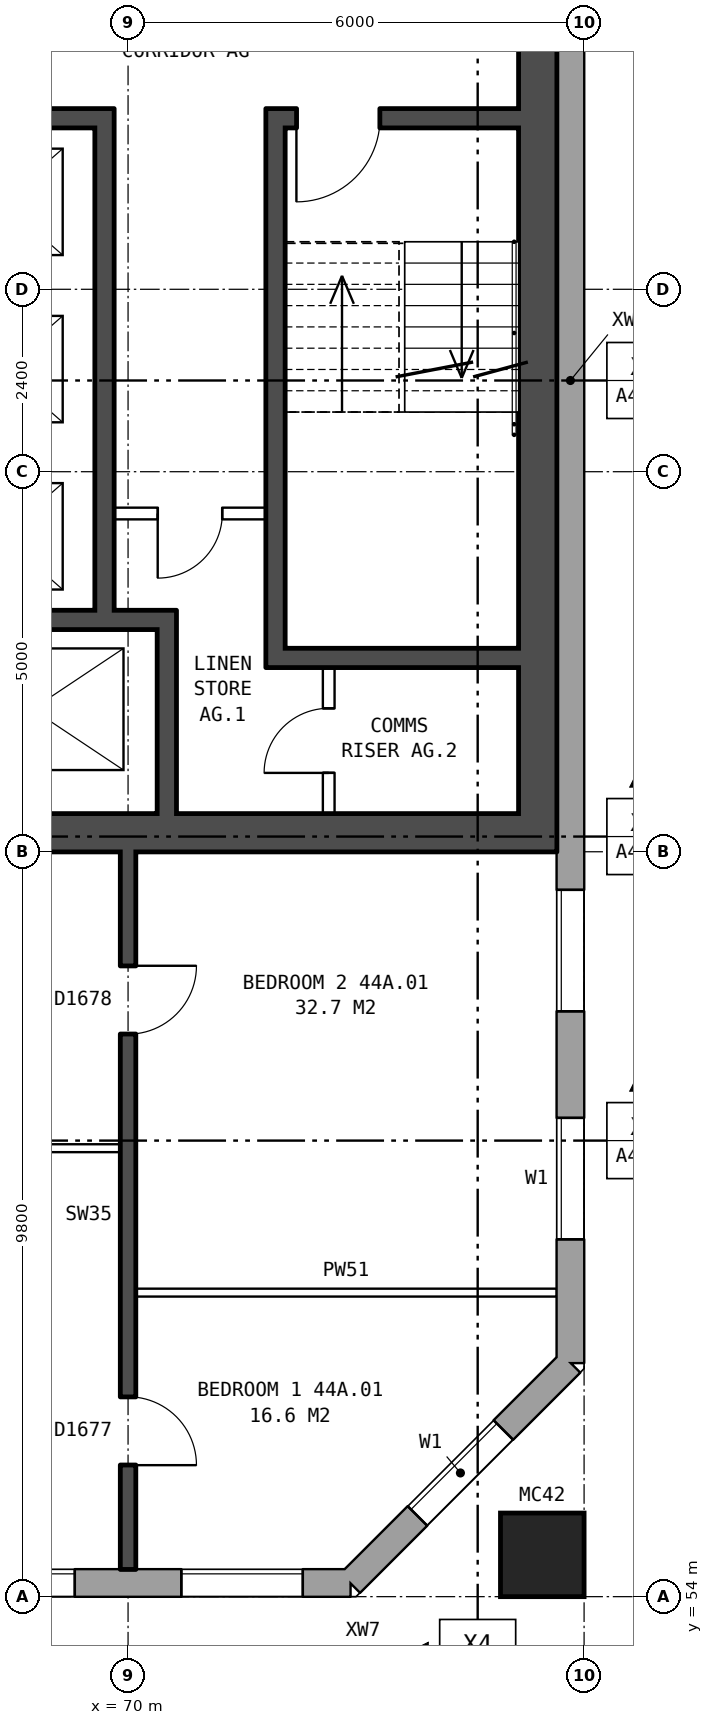
"""IFC4 building model, lengths in metres.
Left out: names, types, materials, properties, quantities, classifications, styles, units other than length and angle.
Written with IfcOpenShell. Run it as: python <this file> out.ifc"""

import sys

from ifc_helpers import new_model, si_unit, direction, frame, frame_2d, origin, origin_2d, place, context, subcontext, project, spatial, rectangle, hollow_rectangle, extrude, element, fill, save


model = new_model("IFC4")
c1 = context("Model", 3, precision=1e-05, world=origin(), true_north=direction((0.0, 1.0)))
c2 = subcontext(c1, "Body", "Model", "MODEL_VIEW")
j1 = project(units=[si_unit("LENGTHUNIT", "METRE"), si_unit("PLANEANGLEUNIT", "RADIAN")], contexts=[c1])
p1 = place(None, origin())
s1 = spatial("IfcSite", under=j1, at=p1, CompositionType="ELEMENT")
p2 = place(p1, origin())
s2 = spatial("IfcBuilding", under=s1, at=p2, CompositionType="ELEMENT")
p3 = place(p2, frame((0.0, 0.0, 157.8)))
s3 = spatial("IfcBuildingStorey", under=s2, at=p3, CompositionType="ELEMENT", Elevation=157.8)
p4 = place(p3, frame((75.45, 54.55, 0.0), z_axis=(0.0, 0.0, 1.0), x_axis=(1.0, 0.0, 0.0)))
e1 = element("IfcColumn", 1, at=p4, inside=s3, PredefinedType="COLUMN", context=c2, shape_type="SweptSolid", body=[
    extrude(hollow_rectangle(XDim=1.1, YDim=1.1, WallThickness=0.06, at=origin_2d()), origin(), (0.0, 0.0, 1.0), 3.1),
])
p5 = place(p3, frame((31.575, 54.18, 0.0), z_axis=(0.0, 0.0, 1.0), x_axis=(1.0, 0.0, 0.0)))
e2 = element("IfcWall", 2, at=p5, inside=s3, PredefinedType="STANDARD", context=c2, shape_type="SweptSolid", body=[
    extrude(rectangle(XDim=41.351, YDim=0.36, at=frame_2d((20.675, 0.0))), origin(), (0.0, 0.0, 1.0), 2.85),
])
p6 = place(p5, frame((3.125, 0.0, 0.8)))
e3 = element("IfcOpeningElement", 3, at=p6, cuts=e2, PredefinedType="OPENING", context=c2, shape_type="SweptSolid", body=[
    extrude(rectangle(XDim=1.6, YDim=1.8, at=frame_2d((0.8, 0.9))), frame((0.0, 0.19, 0.0), z_axis=(0.0, -1.0, 0.0), x_axis=(1.0, 0.0, 0.0)), (0.0, 0.0, 1.0), 0.38),
])
p7 = place(p5, frame((6.125, 0.0, 0.8)))
e4 = element("IfcOpeningElement", 4, at=p7, cuts=e2, PredefinedType="OPENING", context=c2, shape_type="SweptSolid", body=[
    extrude(rectangle(XDim=1.6, YDim=1.8, at=frame_2d((0.8, 0.9))), frame((0.0, 0.19, 0.0), z_axis=(0.0, -1.0, 0.0), x_axis=(1.0, 0.0, 0.0)), (0.0, 0.0, 1.0), 0.38),
])
p8 = place(p5, frame((8.625, 0.0, 0.8)))
e5 = element("IfcOpeningElement", 5, at=p8, cuts=e2, PredefinedType="OPENING", context=c2, shape_type="SweptSolid", body=[
    extrude(rectangle(XDim=1.0, YDim=1.8, at=frame_2d((0.5, 0.9))), frame((0.0, 0.19, 0.0), z_axis=(0.0, -1.0, 0.0), x_axis=(1.0, 0.0, 0.0)), (0.0, 0.0, 1.0), 0.38),
])
p9 = place(p5, frame((9.925, 0.0, 1.6)))
e6 = element("IfcOpeningElement", 6, at=p9, cuts=e2, PredefinedType="OPENING", context=c2, shape_type="SweptSolid", body=[
    extrude(rectangle(XDim=0.8, YDim=0.9, at=frame_2d((0.4, 0.45))), frame((0.0, 0.19, 0.0), z_axis=(0.0, -1.0, 0.0), x_axis=(1.0, 0.0, 0.0)), (0.0, 0.0, 1.0), 0.38),
])
p10 = place(p5, frame((15.125, 0.0, 0.8)))
e7 = element("IfcOpeningElement", 7, at=p10, cuts=e2, PredefinedType="OPENING", context=c2, shape_type="SweptSolid", body=[
    extrude(rectangle(XDim=1.6, YDim=1.8, at=frame_2d((0.8, 0.9))), frame((0.0, 0.19, 0.0), z_axis=(0.0, -1.0, 0.0), x_axis=(1.0, 0.0, 0.0)), (0.0, 0.0, 1.0), 0.38),
])
p11 = place(p5, frame((18.125, 0.0, 0.8)))
e8 = element("IfcOpeningElement", 8, at=p11, cuts=e2, PredefinedType="OPENING", context=c2, shape_type="SweptSolid", body=[
    extrude(rectangle(XDim=1.6, YDim=1.8, at=frame_2d((0.8, 0.9))), frame((0.0, 0.19, 0.0), z_axis=(0.0, -1.0, 0.0), x_axis=(1.0, 0.0, 0.0)), (0.0, 0.0, 1.0), 0.38),
])
p12 = place(p5, frame((21.125, 0.0, 0.8)))
e9 = element("IfcOpeningElement", 9, at=p12, cuts=e2, PredefinedType="OPENING", context=c2, shape_type="SweptSolid", body=[
    extrude(rectangle(XDim=1.6, YDim=1.8, at=frame_2d((0.8, 0.9))), frame((0.0, 0.19, 0.0), z_axis=(0.0, -1.0, 0.0), x_axis=(1.0, 0.0, 0.0)), (0.0, 0.0, 1.0), 0.38),
])
p13 = place(p5, frame((24.125, 0.0, 0.8)))
e10 = element("IfcOpeningElement", 10, at=p13, cuts=e2, PredefinedType="OPENING", context=c2, shape_type="SweptSolid", body=[
    extrude(rectangle(XDim=1.6, YDim=1.8, at=frame_2d((0.8, 0.9))), frame((0.0, 0.19, 0.0), z_axis=(0.0, -1.0, 0.0), x_axis=(1.0, 0.0, 0.0)), (0.0, 0.0, 1.0), 0.38),
])
p14 = place(p5, frame((26.625, 0.0, 0.8)))
e11 = element("IfcOpeningElement", 11, at=p14, cuts=e2, PredefinedType="OPENING", context=c2, shape_type="SweptSolid", body=[
    extrude(rectangle(XDim=1.4, YDim=1.8, at=frame_2d((0.7, 0.9))), frame((0.0, 0.19, 0.0), z_axis=(0.0, -1.0, 0.0), x_axis=(1.0, 0.0, 0.0)), (0.0, 0.0, 1.0), 0.38),
])
p15 = place(p5, frame((30.475, 0.0, 1.7)))
e12 = element("IfcOpeningElement", 12, at=p15, cuts=e2, PredefinedType="OPENING", context=c2, shape_type="SweptSolid", body=[
    extrude(rectangle(XDim=0.8, YDim=0.9, at=frame_2d((0.4, 0.45))), frame((0.0, 0.19, 0.0), z_axis=(0.0, -1.0, 0.0), x_axis=(1.0, 0.0, 0.0)), (0.0, 0.0, 1.0), 0.38),
])
p16 = place(p5, frame((33.125, 0.0, 0.8)))
e13 = element("IfcOpeningElement", 13, at=p16, cuts=e2, PredefinedType="OPENING", context=c2, shape_type="SweptSolid", body=[
    extrude(rectangle(XDim=1.6, YDim=1.8, at=frame_2d((0.8, 0.9))), frame((0.0, 0.19, 0.0), z_axis=(0.0, -1.0, 0.0), x_axis=(1.0, 0.0, 0.0)), (0.0, 0.0, 1.0), 0.38),
])
p17 = place(p5, frame((36.125, 0.0, 0.8)))
e14 = element("IfcOpeningElement", 14, at=p17, cuts=e2, PredefinedType="OPENING", context=c2, shape_type="SweptSolid", body=[
    extrude(rectangle(XDim=1.6, YDim=1.8, at=frame_2d((0.8, 0.9))), frame((0.0, 0.19, 0.0), z_axis=(0.0, -1.0, 0.0), x_axis=(1.0, 0.0, 0.0)), (0.0, 0.0, 1.0), 0.38),
])
p18 = place(p5, frame((39.125, 0.0, 0.8)))
e15 = element("IfcOpeningElement", 15, at=p18, cuts=e2, PredefinedType="OPENING", context=c2, shape_type="SweptSolid", body=[
    extrude(rectangle(XDim=1.6, YDim=1.8, at=frame_2d((0.8, 0.9))), frame((0.0, 0.19, 0.0), z_axis=(0.0, -1.0, 0.0), x_axis=(1.0, 0.0, 0.0)), (0.0, 0.0, 1.0), 0.38),
])
p19 = place(p5, frame((12.125, 0.0, 0.8)))
e16 = element("IfcOpeningElement", 16, at=p19, cuts=e2, PredefinedType="OPENING", context=c2, shape_type="SweptSolid", body=[
    extrude(rectangle(XDim=1.0, YDim=0.9, at=frame_2d((0.5, 0.45))), frame((0.0, 0.19, 0.0), z_axis=(0.0, -1.0, 0.0), x_axis=(1.0, 0.0, 0.0)), (0.0, 0.0, 1.0), 0.38),
])
p20 = place(p5, frame((13.425, 0.0, 0.8)))
e17 = element("IfcOpeningElement", 17, at=p20, cuts=e2, PredefinedType="OPENING", context=c2, shape_type="SweptSolid", body=[
    extrude(rectangle(XDim=0.8, YDim=1.8, at=frame_2d((0.4, 0.9))), frame((0.0, 0.19, 0.0), z_axis=(0.0, -1.0, 0.0), x_axis=(1.0, 0.0, 0.0)), (0.0, 0.0, 1.0), 0.38),
])
p21 = place(p5, frame((28.325, 0.0, 0.8)))
e18 = element("IfcOpeningElement", 18, at=p21, cuts=e2, PredefinedType="OPENING", context=c2, shape_type="SweptSolid", body=[
    extrude(rectangle(XDim=0.8, YDim=0.9, at=frame_2d((0.4, 0.45))), frame((0.0, 0.19, 0.0), z_axis=(0.0, -1.0, 0.0), x_axis=(1.0, 0.0, 0.0)), (0.0, 0.0, 1.0), 0.38),
])
p22 = place(p5, frame((31.625, 0.0, 0.8)))
e19 = element("IfcOpeningElement", 19, at=p22, cuts=e2, PredefinedType="OPENING", context=c2, shape_type="SweptSolid", body=[
    extrude(rectangle(XDim=0.6, YDim=1.8, at=frame_2d((0.3, 0.9))), frame((0.0, 0.19, 0.0), z_axis=(0.0, -1.0, 0.0), x_axis=(1.0, 0.0, 0.0)), (0.0, 0.0, 1.0), 0.38),
])
p23 = place(p3, frame((72.925, 54.18, 0.0), z_axis=(0.0, 0.0, 1.0), x_axis=(0.707106781187, 0.707106781187, 0.0)))
e20 = element("IfcWall", 20, at=p23, inside=s3, PredefinedType="STANDARD", context=c2, shape_type="SweptSolid", body=[
    extrude(rectangle(XDim=4.094, YDim=0.36, at=frame_2d((2.047, 0.0))), origin(), (0.0, 0.0, 1.0), 2.85),
])
p24 = place(p23, frame((1.247, 0.0, 0.8)))
e21 = element("IfcOpeningElement", 21, at=p24, cuts=e20, PredefinedType="OPENING", context=c2, shape_type="SweptSolid", body=[
    extrude(rectangle(XDim=1.6, YDim=1.8, at=frame_2d((0.8, 0.9))), frame((0.0, 0.19, 0.0), z_axis=(0.0, -1.0, 0.0), x_axis=(1.0, 0.0, 0.0)), (0.0, 0.0, 1.0), 0.38),
])
p25 = place(p3, frame((75.82, 57.075, 0.0), z_axis=(0.0, 0.0, 1.0), x_axis=(0.0, 1.0, 0.0)))
e22 = element("IfcWall", 22, at=p25, inside=s3, PredefinedType="STANDARD", context=c2, shape_type="SweptSolid", body=[
    extrude(rectangle(XDim=25.851, YDim=0.36, at=frame_2d((12.925, 0.0))), origin(), (0.0, 0.0, 1.0), 2.85),
])
p26 = place(p25, frame((1.625, 0.0, 0.8)))
e23 = element("IfcOpeningElement", 23, at=p26, cuts=e22, PredefinedType="OPENING", context=c2, shape_type="SweptSolid", body=[
    extrude(rectangle(XDim=1.6, YDim=1.8, at=frame_2d((0.8, 0.9))), frame((0.0, 0.19, 0.0), z_axis=(0.0, -1.0, 0.0), x_axis=(1.0, 0.0, 0.0)), (0.0, 0.0, 1.0), 0.38),
])
p27 = place(p25, frame((4.625, 0.0, 0.8)))
e24 = element("IfcOpeningElement", 24, at=p27, cuts=e22, PredefinedType="OPENING", context=c2, shape_type="SweptSolid", body=[
    extrude(rectangle(XDim=1.6, YDim=1.8, at=frame_2d((0.8, 0.9))), frame((0.0, 0.19, 0.0), z_axis=(0.0, -1.0, 0.0), x_axis=(1.0, 0.0, 0.0)), (0.0, 0.0, 1.0), 0.38),
])
p28 = place(p25, frame((19.625, 0.0, 0.8)))
e25 = element("IfcOpeningElement", 25, at=p28, cuts=e22, PredefinedType="OPENING", context=c2, shape_type="SweptSolid", body=[
    extrude(rectangle(XDim=1.6, YDim=1.8, at=frame_2d((0.8, 0.9))), frame((0.0, 0.19, 0.0), z_axis=(0.0, -1.0, 0.0), x_axis=(1.0, 0.0, 0.0)), (0.0, 0.0, 1.0), 0.38),
])
p29 = place(p25, frame((22.625, 0.0, 0.8)))
e26 = element("IfcOpeningElement", 26, at=p29, cuts=e22, PredefinedType="OPENING", context=c2, shape_type="SweptSolid", body=[
    extrude(rectangle(XDim=1.6, YDim=1.8, at=frame_2d((0.8, 0.9))), frame((0.0, 0.19, 0.0), z_axis=(0.0, -1.0, 0.0), x_axis=(1.0, 0.0, 0.0)), (0.0, 0.0, 1.0), 0.38),
])
p30 = place(p3, frame((75.39, 63.8, 0.0), z_axis=(0.0, 0.0, 1.0), x_axis=(0.0, 1.0, 0.0)))
e27 = element("IfcWall", 27, at=p30, inside=s3, PredefinedType="SHEAR", context=c2, shape_type="SweptSolid", body=[
    extrude(rectangle(XDim=12.4, YDim=0.5, at=frame_2d((6.2, 0.0))), origin(), (0.0, 0.0, 1.0), 2.85),
])
p31 = place(p3, frame((67.14, 64.05, 0.0), z_axis=(0.0, 0.0, 1.0), x_axis=(1.0, 0.0, 0.0)))
e28 = element("IfcWall", 28, at=p31, inside=s3, PredefinedType="SHEAR", context=c2, shape_type="SweptSolid", body=[
    extrude(rectangle(XDim=8.0, YDim=0.5, at=frame_2d((4.0, 0.0))), origin(), (0.0, 0.0, 1.0), 2.85),
])
p32 = place(p3, frame((72.065, 66.35, 0.0), z_axis=(0.0, 0.0, 1.0), x_axis=(1.0, 0.0, 0.0)))
e29 = element("IfcWall", 29, at=p32, inside=s3, PredefinedType="SHEAR", context=c2, shape_type="SweptSolid", body=[
    extrude(rectangle(XDim=3.075, YDim=0.25, at=frame_2d((1.538, 0.0))), origin(), (0.0, 0.0, 1.0), 2.85),
])
p33 = place(p3, frame((67.14, 66.85, 0.0), z_axis=(0.0, 0.0, 1.0), x_axis=(1.0, 0.0, 0.0)))
e30 = element("IfcWall", 30, at=p33, inside=s3, PredefinedType="SHEAR", context=c2, shape_type="SweptSolid", body=[
    extrude(rectangle(XDim=3.495, YDim=0.25, at=frame_2d((1.748, 0.0))), origin(), (0.0, 0.0, 1.0), 2.85),
])
p34 = place(p3, frame((69.815, 68.25, 0.0), z_axis=(0.0, 0.0, 1.0), x_axis=(1.0, 0.0, 0.0)))
e31 = element("IfcWall", 31, at=p34, inside=s3, PredefinedType="PARTITIONING", context=c2, shape_type="SweptSolid", body=[
    extrude(rectangle(XDim=2.0, YDim=0.15, at=frame_2d((1.0, 0.0))), origin(), (0.0, 0.0, 1.0), 2.85),
])
p35 = place(p34, frame((0.575, 0.0, 0.0)))
e32 = element("IfcOpeningElement", 32, at=p35, cuts=e31, PredefinedType="OPENING", context=c2, shape_type="SweptSolid", body=[
    extrude(rectangle(XDim=0.85, YDim=2.1, at=frame_2d((0.425, 1.05))), frame((0.0, 0.085, 0.0), z_axis=(0.0, -1.0, 0.0), x_axis=(1.0, 0.0, 0.0)), (0.0, 0.0, 1.0), 0.17),
])
p36 = place(p3, frame((67.14, 73.45, 0.0), z_axis=(0.0, 0.0, 1.0), x_axis=(1.0, 0.0, 0.0)))
e33 = element("IfcWall", 33, at=p36, inside=s3, PredefinedType="SHEAR", context=c2, shape_type="SweptSolid", body=[
    extrude(rectangle(XDim=2.425, YDim=0.25, at=frame_2d((1.212, 0.0))), origin(), (0.0, 0.0, 1.0), 2.85),
])
p37 = place(p3, frame((72.065, 73.45, 0.0), z_axis=(0.0, 0.0, 1.0), x_axis=(1.0, 0.0, 0.0)))
e34 = element("IfcWall", 34, at=p37, inside=s3, PredefinedType="SHEAR", context=c2, shape_type="SweptSolid", body=[
    extrude(rectangle(XDim=3.075, YDim=0.25, at=frame_2d((1.538, 0.0))), origin(), (0.0, 0.0, 1.0), 2.85),
])
p38 = place(p37, frame((0.15, 0.0, 0.0)))
e35 = element("IfcOpeningElement", 35, at=p38, cuts=e34, PredefinedType="OPENING", context=c2, shape_type="SweptSolid", body=[
    extrude(rectangle(XDim=1.1, YDim=2.1, at=frame_2d((0.55, 1.05))), frame((0.0, 0.135, 0.0), z_axis=(0.0, -1.0, 0.0), x_axis=(1.0, 0.0, 0.0)), (0.0, 0.0, 1.0), 0.27),
])
p39 = place(p3, frame((69.69, 66.975, 0.0), z_axis=(0.0, 0.0, 1.0), x_axis=(0.0, 1.0, 0.0)))
e36 = element("IfcWall", 36, at=p39, inside=s3, PredefinedType="SHEAR", context=c2, shape_type="SweptSolid", body=[
    extrude(rectangle(XDim=6.6, YDim=0.25, at=frame_2d((3.3, 0.0))), origin(), (0.0, 0.0, 1.0), 2.85),
])
p40 = place(p3, frame((70.51, 64.3, 0.0), z_axis=(0.0, 0.0, 1.0), x_axis=(0.0, 1.0, 0.0)))
e37 = element("IfcWall", 37, at=p40, inside=s3, PredefinedType="SHEAR", context=c2, shape_type="SweptSolid", body=[
    extrude(rectangle(XDim=2.425, YDim=0.25, at=frame_2d((1.212, 0.0))), origin(), (0.0, 0.0, 1.0), 2.85),
])
p41 = place(p3, frame((71.94, 66.225, 0.0), z_axis=(0.0, 0.0, 1.0), x_axis=(0.0, 1.0, 0.0)))
e38 = element("IfcWall", 38, at=p41, inside=s3, PredefinedType="SHEAR", context=c2, shape_type="SweptSolid", body=[
    extrude(rectangle(XDim=7.35, YDim=0.25, at=frame_2d((3.675, 0.0))), origin(), (0.0, 0.0, 1.0), 2.85),
])
p42 = place(p3, frame((72.64, 64.3, 0.0), z_axis=(0.0, 0.0, 1.0), x_axis=(0.0, 1.0, 0.0)))
e39 = element("IfcWall", 39, at=p42, inside=s3, PredefinedType="PARTITIONING", context=c2, shape_type="SweptSolid", body=[
    extrude(rectangle(XDim=1.925, YDim=0.15, at=frame_2d((0.962, 0.0))), origin(), (0.0, 0.0, 1.0), 2.85),
])
p43 = place(p42, frame((0.538, 0.0, 0.0)))
e40 = element("IfcOpeningElement", 40, at=p43, cuts=e39, PredefinedType="OPENING", context=c2, shape_type="SweptSolid", body=[
    extrude(rectangle(XDim=0.85, YDim=2.1, at=frame_2d((0.425, 1.05))), frame((0.0, 0.085, 0.0), z_axis=(0.0, -1.0, 0.0), x_axis=(1.0, 0.0, 0.0)), (0.0, 0.0, 1.0), 0.17),
])
p44 = place(p3, frame((70.1, 58.0, 0.0), z_axis=(0.0, 0.0, 1.0), x_axis=(1.0, 0.0, 0.0)))
e41 = element("IfcWall", 41, at=p44, inside=s3, PredefinedType="PARTITIONING", context=c2, shape_type="SweptSolid", body=[
    extrude(rectangle(XDim=5.54, YDim=0.1, at=frame_2d((2.77, 0.0))), origin(), (0.0, 0.0, 1.0), 2.85),
])
p45 = place(p3, frame((64.1, 59.9, 0.0), z_axis=(0.0, 0.0, 1.0), x_axis=(1.0, 0.0, 0.0)))
e42 = element("IfcWall", 42, at=p45, inside=s3, PredefinedType="PARTITIONING", context=c2, shape_type="SweptSolid", body=[
    extrude(rectangle(XDim=5.8, YDim=0.1, at=frame_2d((2.9, 0.0))), origin(), (0.0, 0.0, 1.0), 2.85),
])
p46 = place(p45, frame((3.6, 0.0, 0.0)))
e43 = element("IfcOpeningElement", 43, at=p46, cuts=e42, PredefinedType="OPENING", context=c2, shape_type="SweptSolid", body=[
    extrude(rectangle(XDim=0.9, YDim=2.1, at=frame_2d((0.45, 1.05))), frame((0.0, 0.06, 0.0), z_axis=(0.0, -1.0, 0.0), x_axis=(1.0, 0.0, 0.0)), (0.0, 0.0, 1.0), 0.12),
])
p47 = place(p45, frame((0.7, 0.0, 0.0)))
e44 = element("IfcOpeningElement", 44, at=p47, cuts=e42, PredefinedType="OPENING", context=c2, shape_type="SweptSolid", body=[
    extrude(rectangle(XDim=0.9, YDim=2.1, at=frame_2d((0.45, 1.05))), frame((0.0, 0.06, 0.0), z_axis=(0.0, -1.0, 0.0), x_axis=(1.0, 0.0, 0.0)), (0.0, 0.0, 1.0), 0.12),
])
p48 = place(p3, frame((70.0, 54.36, 0.0), z_axis=(0.0, 0.0, 1.0), x_axis=(0.0, 1.0, 0.0)))
e45 = element("IfcWall", 45, at=p48, inside=s3, PredefinedType="SOLIDWALL", context=c2, shape_type="SweptSolid", body=[
    extrude(rectangle(XDim=9.44, YDim=0.2, at=frame_2d((4.72, 0.0))), origin(), (0.0, 0.0, 1.0), 2.85),
])
p49 = place(p48, frame((1.37, 0.0, 0.0)))
e46 = element("IfcOpeningElement", 46, at=p49, cuts=e45, PredefinedType="OPENING", context=c2, shape_type="SweptSolid", body=[
    extrude(rectangle(XDim=0.9, YDim=2.1, at=frame_2d((0.45, 1.05))), frame((0.0, 0.11, 0.0), z_axis=(0.0, -1.0, 0.0), x_axis=(1.0, 0.0, 0.0)), (0.0, 0.0, 1.0), 0.22),
])
p50 = place(p48, frame((7.04, 0.0, 0.0)))
e47 = element("IfcOpeningElement", 47, at=p50, cuts=e45, PredefinedType="OPENING", context=c2, shape_type="SweptSolid", body=[
    extrude(rectangle(XDim=0.9, YDim=2.1, at=frame_2d((0.45, 1.05))), frame((0.0, 0.11, 0.0), z_axis=(0.0, -1.0, 0.0), x_axis=(1.0, 0.0, 0.0)), (0.0, 0.0, 1.0), 0.22),
])
p51 = place(p17, origin())
e48 = element("IfcWindow", 48, at=p51, inside=s3, PartitioningType="SINGLE_PANEL", PredefinedType="WINDOW", context=c2, shape_type="SweptSolid", body=[
    extrude(rectangle(XDim=1.6, YDim=1.8, at=frame_2d((0.8, 0.9))), frame((0.0, 0.15, 0.0), z_axis=(0.0, -1.0, 0.0), x_axis=(1.0, 0.0, 0.0)), (0.0, 0.0, 1.0), 0.06),
])
fill(e14, e48)
p52 = place(p18, origin())
e49 = element("IfcWindow", 49, at=p52, inside=s3, PartitioningType="SINGLE_PANEL", PredefinedType="WINDOW", context=c2, shape_type="SweptSolid", body=[
    extrude(rectangle(XDim=1.6, YDim=1.8, at=frame_2d((0.8, 0.9))), frame((0.0, 0.15, 0.0), z_axis=(0.0, -1.0, 0.0), x_axis=(1.0, 0.0, 0.0)), (0.0, 0.0, 1.0), 0.06),
])
fill(e15, e49)
p53 = place(p24, origin())
e50 = element("IfcWindow", 50, at=p53, inside=s3, PartitioningType="SINGLE_PANEL", PredefinedType="WINDOW", context=c2, shape_type="SweptSolid", body=[
    extrude(rectangle(XDim=1.6, YDim=1.8, at=frame_2d((0.8, 0.9))), frame((0.0, 0.15, 0.0), z_axis=(0.0, -1.0, 0.0), x_axis=(1.0, 0.0, 0.0)), (0.0, 0.0, 1.0), 0.06),
])
fill(e21, e50)
p54 = place(p26, origin())
e51 = element("IfcWindow", 51, at=p54, inside=s3, PartitioningType="SINGLE_PANEL", PredefinedType="WINDOW", context=c2, shape_type="SweptSolid", body=[
    extrude(rectangle(XDim=1.6, YDim=1.8, at=frame_2d((0.8, 0.9))), frame((0.0, 0.15, 0.0), z_axis=(0.0, -1.0, 0.0), x_axis=(1.0, 0.0, 0.0)), (0.0, 0.0, 1.0), 0.06),
])
fill(e23, e51)
p55 = place(p27, origin())
e52 = element("IfcWindow", 52, at=p55, inside=s3, PartitioningType="SINGLE_PANEL", PredefinedType="WINDOW", context=c2, shape_type="SweptSolid", body=[
    extrude(rectangle(XDim=1.6, YDim=1.8, at=frame_2d((0.8, 0.9))), frame((0.0, 0.15, 0.0), z_axis=(0.0, -1.0, 0.0), x_axis=(1.0, 0.0, 0.0)), (0.0, 0.0, 1.0), 0.06),
])
fill(e24, e52)
p56 = place(p38, frame((1.1, 0.0, 0.0), z_axis=(0.0, 0.0, 1.0), x_axis=(-1.0, 0.0, 0.0)))
e53 = element("IfcDoor", 53, at=p56, inside=s3, OperationType="SINGLE_SWING_RIGHT", PredefinedType="DOOR", context=c2, shape_type="SweptSolid", body=[
    extrude(rectangle(XDim=1.1, YDim=2.1, at=frame_2d((0.55, 1.05))), frame((0.0, 0.025, 0.0), z_axis=(0.0, -1.0, 0.0), x_axis=(1.0, 0.0, 0.0)), (0.0, 0.0, 1.0), 0.05),
])
fill(e35, e53)
p57 = place(p35, frame((0.85, 0.0, 0.0), z_axis=(0.0, 0.0, 1.0), x_axis=(-1.0, 0.0, 0.0)))
e54 = element("IfcDoor", 54, at=p57, inside=s3, OperationType="SINGLE_SWING_RIGHT", PredefinedType="DOOR", context=c2, shape_type="SweptSolid", body=[
    extrude(rectangle(XDim=0.85, YDim=2.1, at=frame_2d((0.425, 1.05))), frame((0.0, 0.025, 0.0), z_axis=(0.0, -1.0, 0.0), x_axis=(1.0, 0.0, 0.0)), (0.0, 0.0, 1.0), 0.05),
])
fill(e32, e54)
p58 = place(p43, origin())
e55 = element("IfcDoor", 55, at=p58, inside=s3, OperationType="SINGLE_SWING_LEFT", PredefinedType="DOOR", context=c2, shape_type="SweptSolid", body=[
    extrude(rectangle(XDim=0.85, YDim=2.1, at=frame_2d((0.425, 1.05))), frame((0.0, 0.025, 0.0), z_axis=(0.0, -1.0, 0.0), x_axis=(1.0, 0.0, 0.0)), (0.0, 0.0, 1.0), 0.05),
])
fill(e40, e55)
p59 = place(p49, frame((0.9, 0.0, 0.0), z_axis=(0.0, 0.0, 1.0), x_axis=(-1.0, 0.0, 0.0)))
e56 = element("IfcDoor", 56, at=p59, inside=s3, OperationType="SINGLE_SWING_RIGHT", PredefinedType="DOOR", context=c2, shape_type="SweptSolid", body=[
    extrude(rectangle(XDim=0.9, YDim=2.1, at=frame_2d((0.45, 1.05))), frame((0.0, 0.025, 0.0), z_axis=(0.0, -1.0, 0.0), x_axis=(1.0, 0.0, 0.0)), (0.0, 0.0, 1.0), 0.05),
])
fill(e46, e56)
p60 = place(p50, frame((0.9, 0.0, 0.0), z_axis=(0.0, 0.0, 1.0), x_axis=(-1.0, 0.0, 0.0)))
e57 = element("IfcDoor", 57, at=p60, inside=s3, OperationType="SINGLE_SWING_LEFT", PredefinedType="DOOR", context=c2, shape_type="SweptSolid", body=[
    extrude(rectangle(XDim=0.9, YDim=2.1, at=frame_2d((0.45, 1.05))), frame((0.0, 0.025, 0.0), z_axis=(0.0, -1.0, 0.0), x_axis=(1.0, 0.0, 0.0)), (0.0, 0.0, 1.0), 0.05),
])
fill(e47, e57)
save(model, sys.argv[1])
